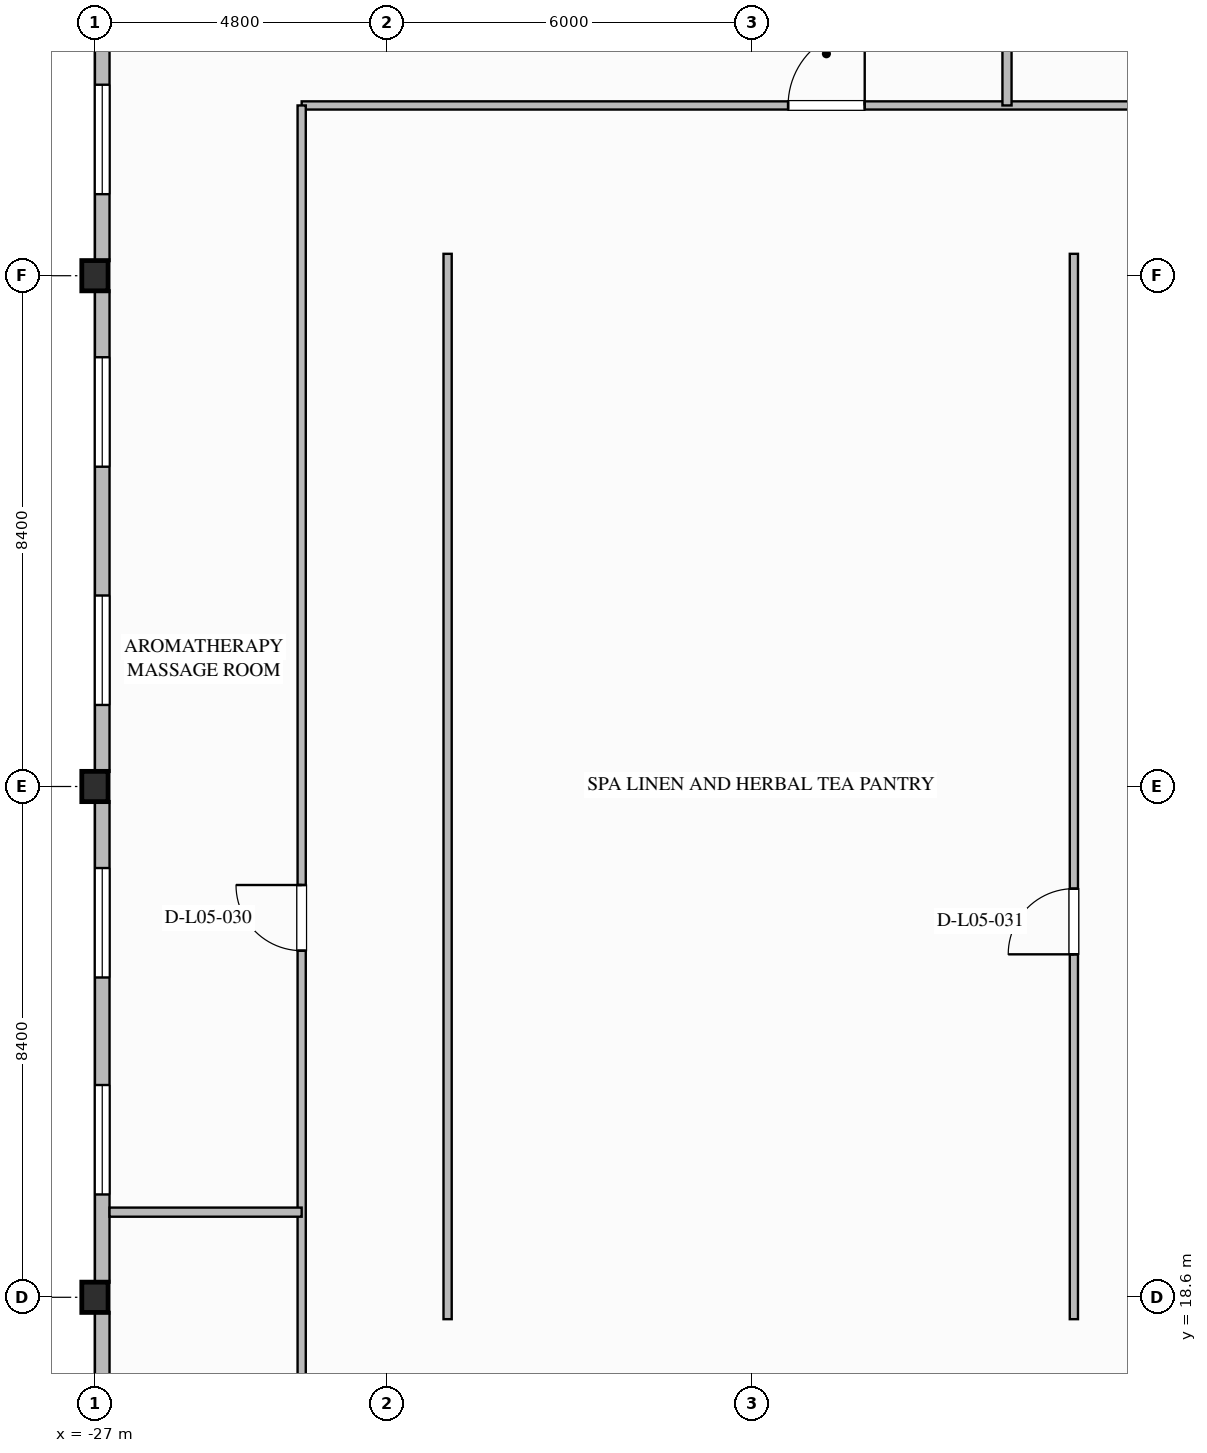
"""IFC4 building model, lengths in metres.
Left out: names, types, materials, properties, quantities, classifications, styles, units other than length and angle.
Written with IfcOpenShell. Run it as: python <this file> out.ifc"""

import sys

from ifc_helpers import new_model, si_unit, direction, frame, frame_2d, origin, origin_2d, place, context, subcontext, project, spatial, rectangle, i_section, extrude, element, fill, save


model = new_model("IFC4")
c1 = context("Model", 3, precision=1e-05, world=origin(), true_north=direction((0.0, 1.0)))
c2 = subcontext(c1, "Body", "Model", "MODEL_VIEW")
j1 = project(units=[si_unit("LENGTHUNIT", "METRE"), si_unit("PLANEANGLEUNIT", "RADIAN")], contexts=[c1])
p1 = place(None, origin())
s1 = spatial("IfcSite", under=j1, at=p1, CompositionType="ELEMENT")
p2 = place(p1, origin())
s2 = spatial("IfcBuilding", under=s1, at=p2, CompositionType="ELEMENT")
p3 = place(p2, frame((0.0, 0.0, 27.6)))
s3 = spatial("IfcBuildingStorey", under=s2, at=p3, CompositionType="ELEMENT", Elevation=27.6)
for number, where, z_axis, x_axis in (
    (1, (-27.0, 18.6, 0.0), (0.0, 0.0, 1.0), (1.0, 0.0, 0.0)),
    (2, (-27.0, 27.0, 0.0), (0.0, 0.0, 1.0), (1.0, 0.0, 0.0)),
    (3, (-27.0, 35.4, 0.0), (0.0, 0.0, 1.0), (1.0, 0.0, 0.0)),
):
    element("IfcColumn", number, at=place(p3, frame(where, z_axis=z_axis, x_axis=x_axis)), inside=s3, PredefinedType="COLUMN", context=c2, shape_type="SweptSolid", body=[
        extrude(i_section(OverallWidth=0.432, OverallDepth=0.498, WebThickness=0.056, FlangeThickness=0.089, FilletRadius=0.03, at=origin_2d()), origin(), (0.0, 0.0, 1.0), 5.32),
    ])
p4 = place(p3, frame((-26.88, 11.041, 0.0), z_axis=(0.0, 0.0, 1.0), x_axis=(0.0, 1.0, 0.0)))
e4 = element("IfcWall", 4, at=p4, inside=s3, PredefinedType="STANDARD", context=c2, shape_type="SweptSolid", body=[
    extrude(rectangle(XDim=7.318, YDim=0.24, at=frame_2d((3.659, 0.0))), origin(), (0.0, 0.0, 1.0), 3.52),
])
p5 = place(p4, frame((1.1, 0.0, 0.7)))
e5 = element("IfcOpeningElement", 5, at=p5, cuts=e4, PredefinedType="OPENING", context=c2, shape_type="SweptSolid", body=[
    extrude(rectangle(XDim=1.8, YDim=2.0, at=frame_2d((0.9, 1.0))), frame((0.0, 0.13, 0.0), z_axis=(0.0, -1.0, 0.0), x_axis=(1.0, 0.0, 0.0)), (0.0, 0.0, 1.0), 0.26),
])
p6 = place(p4, frame((4.418, 0.0, 0.7)))
e6 = element("IfcOpeningElement", 6, at=p6, cuts=e4, PredefinedType="OPENING", context=c2, shape_type="SweptSolid", body=[
    extrude(rectangle(XDim=1.8, YDim=2.0, at=frame_2d((0.9, 1.0))), frame((0.0, 0.13, 0.0), z_axis=(0.0, -1.0, 0.0), x_axis=(1.0, 0.0, 0.0)), (0.0, 0.0, 1.0), 0.26),
])
p7 = place(p3, frame((-26.88, 18.841, 0.0), z_axis=(0.0, 0.0, 1.0), x_axis=(0.0, 1.0, 0.0)))
e7 = element("IfcWall", 7, at=p7, inside=s3, PredefinedType="STANDARD", context=c2, shape_type="SweptSolid", body=[
    extrude(rectangle(XDim=7.918, YDim=0.24, at=frame_2d((3.959, 0.0))), origin(), (0.0, 0.0, 1.0), 3.52),
])
p8 = place(p7, frame((1.45, 0.0, 0.7)))
e8 = element("IfcOpeningElement", 8, at=p8, cuts=e7, PredefinedType="OPENING", context=c2, shape_type="SweptSolid", body=[
    extrude(rectangle(XDim=1.8, YDim=2.0, at=frame_2d((0.9, 1.0))), frame((0.0, 0.13, 0.0), z_axis=(0.0, -1.0, 0.0), x_axis=(1.0, 0.0, 0.0)), (0.0, 0.0, 1.0), 0.26),
])
p9 = place(p7, frame((5.018, 0.0, 0.7)))
e9 = element("IfcOpeningElement", 9, at=p9, cuts=e7, PredefinedType="OPENING", context=c2, shape_type="SweptSolid", body=[
    extrude(rectangle(XDim=1.8, YDim=2.0, at=frame_2d((0.9, 1.0))), frame((0.0, 0.13, 0.0), z_axis=(0.0, -1.0, 0.0), x_axis=(1.0, 0.0, 0.0)), (0.0, 0.0, 1.0), 0.26),
])
p10 = place(p3, frame((-26.88, 27.241, 0.0), z_axis=(0.0, 0.0, 1.0), x_axis=(0.0, 1.0, 0.0)))
e10 = element("IfcWall", 10, at=p10, inside=s3, PredefinedType="STANDARD", context=c2, shape_type="SweptSolid", body=[
    extrude(rectangle(XDim=7.918, YDim=0.24, at=frame_2d((3.959, 0.0))), origin(), (0.0, 0.0, 1.0), 3.52),
])
p11 = place(p10, frame((1.1, 0.0, 0.7)))
e11 = element("IfcOpeningElement", 11, at=p11, cuts=e10, PredefinedType="OPENING", context=c2, shape_type="SweptSolid", body=[
    extrude(rectangle(XDim=1.8, YDim=2.0, at=frame_2d((0.9, 1.0))), frame((0.0, 0.13, 0.0), z_axis=(0.0, -1.0, 0.0), x_axis=(1.0, 0.0, 0.0)), (0.0, 0.0, 1.0), 0.26),
])
p12 = place(p10, frame((5.018, 0.0, 0.7)))
e12 = element("IfcOpeningElement", 12, at=p12, cuts=e10, PredefinedType="OPENING", context=c2, shape_type="SweptSolid", body=[
    extrude(rectangle(XDim=1.8, YDim=2.0, at=frame_2d((0.9, 1.0))), frame((0.0, 0.13, 0.0), z_axis=(0.0, -1.0, 0.0), x_axis=(1.0, 0.0, 0.0)), (0.0, 0.0, 1.0), 0.26),
])
p13 = place(p3, frame((-26.88, 35.641, 0.0), z_axis=(0.0, 0.0, 1.0), x_axis=(0.0, 1.0, 0.0)))
e13 = element("IfcWall", 13, at=p13, inside=s3, PredefinedType="STANDARD", context=c2, shape_type="SweptSolid", body=[
    extrude(rectangle(XDim=7.318, YDim=0.24, at=frame_2d((3.659, 0.0))), origin(), (0.0, 0.0, 1.0), 3.52),
])
p14 = place(p13, frame((1.1, 0.0, 0.7)))
e14 = element("IfcOpeningElement", 14, at=p14, cuts=e13, PredefinedType="OPENING", context=c2, shape_type="SweptSolid", body=[
    extrude(rectangle(XDim=1.8, YDim=2.0, at=frame_2d((0.9, 1.0))), frame((0.0, 0.13, 0.0), z_axis=(0.0, -1.0, 0.0), x_axis=(1.0, 0.0, 0.0)), (0.0, 0.0, 1.0), 0.26),
])
p15 = place(p13, frame((4.418, 0.0, 0.7)))
e15 = element("IfcOpeningElement", 15, at=p15, cuts=e13, PredefinedType="OPENING", context=c2, shape_type="SweptSolid", body=[
    extrude(rectangle(XDim=1.8, YDim=2.0, at=frame_2d((0.9, 1.0))), frame((0.0, 0.13, 0.0), z_axis=(0.0, -1.0, 0.0), x_axis=(1.0, 0.0, 0.0)), (0.0, 0.0, 1.0), 0.26),
])
p16 = place(p3, frame((-23.6, 38.2, 0.0), z_axis=(0.0, 0.0, 1.0), x_axis=(1.0, 0.0, 0.0)))
e16 = element("IfcWall", 16, at=p16, inside=s3, PredefinedType="PARTITIONING", context=c2, shape_type="SweptSolid", body=[
    extrude(rectangle(XDim=47.3, YDim=0.135, at=frame_2d((23.65, 0.0))), origin(), (0.0, 0.0, 1.0), 5.32),
])
p17 = place(p16, frame((39.2, 0.0, 0.0)))
e17 = element("IfcOpeningElement", 17, at=p17, cuts=e16, PredefinedType="OPENING", context=c2, shape_type="SweptSolid", body=[
    extrude(rectangle(XDim=0.98, YDim=2.1, at=frame_2d((0.49, 1.05))), frame((0.0, 0.077, 0.0), z_axis=(0.0, -1.0, 0.0), x_axis=(1.0, 0.0, 0.0)), (0.0, 0.0, 1.0), 0.155),
])
p18 = place(p16, frame((44.0, 0.0, 0.0)))
e18 = element("IfcOpeningElement", 18, at=p18, cuts=e16, PredefinedType="OPENING", context=c2, shape_type="SweptSolid", body=[
    extrude(rectangle(XDim=0.92, YDim=2.1, at=frame_2d((0.46, 1.05))), frame((0.0, 0.077, 0.0), z_axis=(0.0, -1.0, 0.0), x_axis=(1.0, 0.0, 0.0)), (0.0, 0.0, 1.0), 0.155),
])
p19 = place(p16, frame((8.0, 0.0, 0.0)))
e19 = element("IfcOpeningElement", 19, at=p19, cuts=e16, PredefinedType="OPENING", context=c2, shape_type="SweptSolid", body=[
    extrude(rectangle(XDim=1.26, YDim=2.2, at=frame_2d((0.63, 1.1))), frame((0.0, 0.077, 0.0), z_axis=(0.0, -1.0, 0.0), x_axis=(1.0, 0.0, 0.0)), (0.0, 0.0, 1.0), 0.155),
])
p20 = place(p16, frame((18.0, 0.0, 0.0)))
e20 = element("IfcOpeningElement", 20, at=p20, cuts=e16, PredefinedType="OPENING", context=c2, shape_type="SweptSolid", body=[
    extrude(rectangle(XDim=1.26, YDim=2.2, at=frame_2d((0.63, 1.1))), frame((0.0, 0.077, 0.0), z_axis=(0.0, -1.0, 0.0), x_axis=(1.0, 0.0, 0.0)), (0.0, 0.0, 1.0), 0.155),
])
p21 = place(p16, frame((30.0, 0.0, 0.0)))
e21 = element("IfcOpeningElement", 21, at=p21, cuts=e16, PredefinedType="OPENING", context=c2, shape_type="SweptSolid", body=[
    extrude(rectangle(XDim=1.02, YDim=2.15, at=frame_2d((0.51, 1.075))), frame((0.0, 0.077, 0.0), z_axis=(0.0, -1.0, 0.0), x_axis=(1.0, 0.0, 0.0)), (0.0, 0.0, 1.0), 0.155),
])
p22 = place(p3, frame((-10.9, 18.24, 0.0), z_axis=(0.0, 0.0, 1.0), x_axis=(0.0, 1.0, 0.0)))
e22 = element("IfcWall", 22, at=p22, inside=s3, PredefinedType="PARTITIONING", context=c2, shape_type="SweptSolid", body=[
    extrude(rectangle(XDim=17.52, YDim=0.135, at=frame_2d((8.76, 0.0))), origin(), (0.0, 0.0, 1.0), 5.32),
])
p23 = place(p22, frame((6.0, 0.0, 0.0)))
e23 = element("IfcOpeningElement", 23, at=p23, cuts=e22, PredefinedType="OPENING", context=c2, shape_type="SweptSolid", body=[
    extrude(rectangle(XDim=1.08, YDim=2.04, at=frame_2d((0.54, 1.02))), frame((0.0, 0.077, 0.0), z_axis=(0.0, -1.0, 0.0), x_axis=(1.0, 0.0, 0.0)), (0.0, 0.0, 1.0), 0.155),
])
p24 = place(p3, frame((-21.2, 18.24, 0.0), z_axis=(0.0, 0.0, 1.0), x_axis=(0.0, 1.0, 0.0)))
e24 = element("IfcWall", 24, at=p24, inside=s3, PredefinedType="PARTITIONING", context=c2, shape_type="SweptSolid", body=[
    extrude(rectangle(XDim=17.52, YDim=0.135, at=frame_2d((8.76, 0.0))), origin(), (0.0, 0.0, 1.0), 5.32),
])
p25 = place(p3, frame((-23.6, 0.3, 0.0), z_axis=(0.0, 0.0, 1.0), x_axis=(0.0, 1.0, 0.0)))
e25 = element("IfcWall", 25, at=p25, inside=s3, PredefinedType="PARTITIONING", context=c2, shape_type="SweptSolid", body=[
    extrude(rectangle(XDim=37.9, YDim=0.135, at=frame_2d((18.95, 0.0))), origin(), (0.0, 0.0, 1.0), 5.32),
])
p26 = place(p25, frame((9.0, 0.0, 0.0)))
e26 = element("IfcOpeningElement", 26, at=p26, cuts=e25, PredefinedType="OPENING", context=c2, shape_type="SweptSolid", body=[
    extrude(rectangle(XDim=1.08, YDim=2.04, at=frame_2d((0.54, 1.02))), frame((0.0, 0.077, 0.0), z_axis=(0.0, -1.0, 0.0), x_axis=(1.0, 0.0, 0.0)), (0.0, 0.0, 1.0), 0.155),
])
p27 = place(p25, frame((24.0, 0.0, 0.0)))
e27 = element("IfcOpeningElement", 27, at=p27, cuts=e25, PredefinedType="OPENING", context=c2, shape_type="SweptSolid", body=[
    extrude(rectangle(XDim=1.08, YDim=2.04, at=frame_2d((0.54, 1.02))), frame((0.0, 0.077, 0.0), z_axis=(0.0, -1.0, 0.0), x_axis=(1.0, 0.0, 0.0)), (0.0, 0.0, 1.0), 0.155),
])
p28 = place(p3, frame((-12.0, 38.2, 0.0), z_axis=(0.0, 0.0, 1.0), x_axis=(0.0, 1.0, 0.0)))
e28 = element("IfcWall", 28, at=p28, inside=s3, PredefinedType="PARTITIONING", context=c2, shape_type="SweptSolid", body=[
    extrude(rectangle(XDim=15.5, YDim=0.15, at=frame_2d((7.75, 0.0))), origin(), (0.0, 0.0, 1.0), 5.32),
])
p29 = place(p3, frame((-26.76, 20.0, 0.0), z_axis=(0.0, 0.0, 1.0), x_axis=(1.0, 0.0, 0.0)))
e29 = element("IfcWall", 29, at=p29, inside=s3, PredefinedType="PARTITIONING", context=c2, shape_type="SweptSolid", body=[
    extrude(rectangle(XDim=3.16, YDim=0.15, at=frame_2d((1.58, 0.0))), origin(), (0.0, 0.0, 1.0), 5.32),
])
p30 = place(p8, origin())
e30 = element("IfcWindow", 30, at=p30, inside=s3, PartitioningType="SINGLE_PANEL", PredefinedType="WINDOW", context=c2, shape_type="SweptSolid", body=[
    extrude(rectangle(XDim=1.8, YDim=2.0, at=frame_2d((0.9, 1.0))), frame((0.0, 0.03, 0.0), z_axis=(0.0, -1.0, 0.0), x_axis=(1.0, 0.0, 0.0)), (0.0, 0.0, 1.0), 0.06),
])
fill(e8, e30)
p31 = place(p9, origin())
e31 = element("IfcWindow", 31, at=p31, inside=s3, PartitioningType="SINGLE_PANEL", PredefinedType="WINDOW", context=c2, shape_type="SweptSolid", body=[
    extrude(rectangle(XDim=1.8, YDim=2.0, at=frame_2d((0.9, 1.0))), frame((0.0, 0.03, 0.0), z_axis=(0.0, -1.0, 0.0), x_axis=(1.0, 0.0, 0.0)), (0.0, 0.0, 1.0), 0.06),
])
fill(e9, e31)
p32 = place(p11, origin())
e32 = element("IfcWindow", 32, at=p32, inside=s3, PartitioningType="SINGLE_PANEL", PredefinedType="WINDOW", context=c2, shape_type="SweptSolid", body=[
    extrude(rectangle(XDim=1.8, YDim=2.0, at=frame_2d((0.9, 1.0))), frame((0.0, 0.03, 0.0), z_axis=(0.0, -1.0, 0.0), x_axis=(1.0, 0.0, 0.0)), (0.0, 0.0, 1.0), 0.06),
])
fill(e11, e32)
p33 = place(p12, origin())
e33 = element("IfcWindow", 33, at=p33, inside=s3, PartitioningType="SINGLE_PANEL", PredefinedType="WINDOW", context=c2, shape_type="SweptSolid", body=[
    extrude(rectangle(XDim=1.8, YDim=2.0, at=frame_2d((0.9, 1.0))), frame((0.0, 0.03, 0.0), z_axis=(0.0, -1.0, 0.0), x_axis=(1.0, 0.0, 0.0)), (0.0, 0.0, 1.0), 0.06),
])
fill(e12, e33)
p34 = place(p14, origin())
e34 = element("IfcWindow", 34, at=p34, inside=s3, PartitioningType="SINGLE_PANEL", PredefinedType="WINDOW", context=c2, shape_type="SweptSolid", body=[
    extrude(rectangle(XDim=1.8, YDim=2.0, at=frame_2d((0.9, 1.0))), frame((0.0, 0.03, 0.0), z_axis=(0.0, -1.0, 0.0), x_axis=(1.0, 0.0, 0.0)), (0.0, 0.0, 1.0), 0.06),
])
fill(e14, e34)
p35 = place(p19, origin())
e35 = element("IfcDoor", 35, at=p35, inside=s3, OperationType="SINGLE_SWING_RIGHT", PredefinedType="DOOR", context=c2, shape_type="SweptSolid", body=[
    extrude(rectangle(XDim=1.26, YDim=2.2, at=frame_2d((0.63, 1.1))), frame((0.0, 0.025, 0.0), z_axis=(0.0, -1.0, 0.0), x_axis=(1.0, 0.0, 0.0)), (0.0, 0.0, 1.0), 0.05),
])
fill(e19, e35)
p36 = place(p27, origin())
e36 = element("IfcDoor", 36, at=p36, inside=s3, OperationType="SINGLE_SWING_RIGHT", PredefinedType="DOOR", context=c2, shape_type="SweptSolid", body=[
    extrude(rectangle(XDim=1.08, YDim=2.04, at=frame_2d((0.54, 1.02))), frame((0.0, 0.025, 0.0), z_axis=(0.0, -1.0, 0.0), x_axis=(1.0, 0.0, 0.0)), (0.0, 0.0, 1.0), 0.05),
])
fill(e27, e36)
p37 = place(p23, origin())
e37 = element("IfcDoor", 37, at=p37, inside=s3, OperationType="SINGLE_SWING_LEFT", PredefinedType="DOOR", context=c2, shape_type="SweptSolid", body=[
    extrude(rectangle(XDim=1.08, YDim=2.04, at=frame_2d((0.54, 1.02))), frame((0.0, 0.025, 0.0), z_axis=(0.0, -1.0, 0.0), x_axis=(1.0, 0.0, 0.0)), (0.0, 0.0, 1.0), 0.05),
])
fill(e23, e37)
save(model, sys.argv[1])
